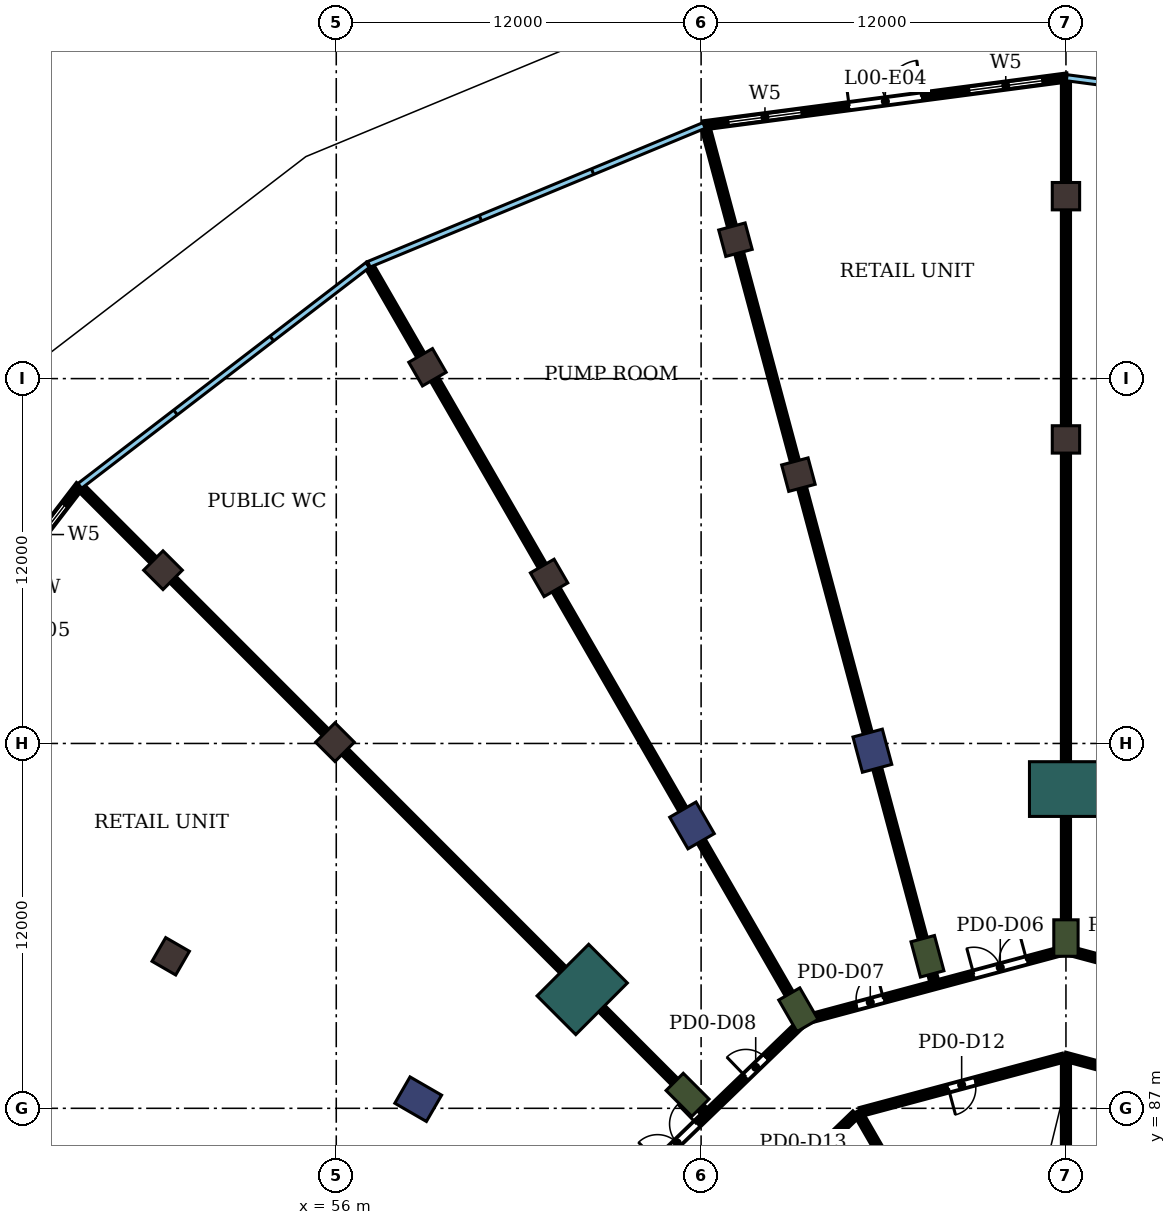
"""IFC4 building model, lengths in metres.
Left out: names, types, materials, properties, quantities, classifications, styles, units other than length and angle.
Written with IfcOpenShell. Run it as: python <this file> out.ifc"""

import sys

from ifc_helpers import new_model, si_unit, direction, frame, frame_2d, origin, origin_2d, place, context, subcontext, project, spatial, rectangle, extrude, element, fill, save


model = new_model("IFC4")
c1 = context("Model", 3, precision=1e-05, world=origin(), true_north=direction((0.0, 1.0)))
c2 = subcontext(c1, "Body", "Model", "MODEL_VIEW")
j1 = project(units=[si_unit("LENGTHUNIT", "METRE"), si_unit("PLANEANGLEUNIT", "RADIAN")], contexts=[c1])
p1 = place(None, origin())
s1 = spatial("IfcSite", under=j1, at=p1, CompositionType="ELEMENT")
p2 = place(p1, origin())
s2 = spatial("IfcBuilding", under=s1, at=p2, CompositionType="ELEMENT")
p3 = place(p2, origin())
s3 = spatial("IfcBuildingStorey", under=s2, at=p3, CompositionType="ELEMENT", Elevation=0.0)
for number, where, z_axis, x_axis in (
    (1, (80.0, 117.0, 0.0), (0.0, 0.0, 1.0), (0.0, 1.0, 0.0)),
    (2, (69.13, 115.569, 0.0), (0.0, 0.0, 1.0), (-0.259, 0.966, 0.0)),
    (3, (59.0, 111.373, 0.0), (0.0, 0.0, 1.0), (-0.5, 0.866, 0.0)),
    (4, (50.302, 104.698, 0.0), (0.0, 0.0, 1.0), (-0.707, 0.707, 0.0)),
    (5, (80.0, 109.0, 0.0), (0.0, 0.0, 1.0), (0.0, 1.0, 0.0)),
    (6, (71.2, 107.842, 0.0), (0.0, 0.0, 1.0), (-0.259, 0.966, 0.0)),
    (7, (63.0, 104.445, 0.0), (0.0, 0.0, 1.0), (-0.5, 0.866, 0.0)),
    (8, (55.958, 99.042, 0.0), (0.0, 0.0, 1.0), (-0.707, 0.707, 0.0)),
    (9, (50.555, 92.0, 0.0), (0.0, 0.0, 1.0), (-0.866, 0.5, 0.0)),
):
    element("IfcColumn", number, at=place(p3, frame(where, z_axis=z_axis, x_axis=x_axis)), inside=s3, PredefinedType="COLUMN", context=c2, shape_type="SweptSolid", body=[
        extrude(rectangle(XDim=0.9, YDim=0.9, at=origin_2d()), origin(), (0.0, 0.0, 1.0), 7.0),
    ])
for number, where, z_axis, x_axis in (
    (10, (73.633, 98.762, 0.0), (0.0, 0.0, 1.0), (-0.259, 0.966, 0.0)),
    (11, (67.7, 96.304, 0.0), (0.0, 0.0, 1.0), (-0.5, 0.866, 0.0)),
    (12, (58.696, 87.3, 0.0), (0.0, 0.0, 1.0), (-0.866, 0.5, 0.0)),
):
    element("IfcColumn", number, at=place(p3, frame(where, z_axis=z_axis, x_axis=x_axis)), inside=s3, PredefinedType="COLUMN", context=c2, shape_type="SweptSolid", body=[
        extrude(rectangle(XDim=1.2, YDim=1.0, at=origin_2d()), origin(), (0.0, 0.0, 1.0), 7.0),
    ])
for number, where, z_axis, x_axis in (
    (13, (80.0, 92.6, 0.0), (0.0, 0.0, 1.0), (0.0, 1.0, 0.0)),
    (14, (75.445, 92.0, 0.0), (0.0, 0.0, 1.0), (-0.259, 0.966, 0.0)),
    (15, (71.2, 90.242, 0.0), (0.0, 0.0, 1.0), (-0.5, 0.866, 0.0)),
    (16, (67.555, 87.445, 0.0), (0.0, 0.0, 1.0), (-0.707, 0.707, 0.0)),
):
    element("IfcColumn", number, at=place(p3, frame(where, z_axis=z_axis, x_axis=x_axis)), inside=s3, PredefinedType="COLUMN", context=c2, shape_type="SweptSolid", body=[
        extrude(rectangle(XDim=1.2, YDim=0.8, at=origin_2d()), origin(), (0.0, 0.0, 1.0), 7.0),
    ])
for number, where, z_axis, x_axis in (
    (17, (80.0, 97.5, 0.0), (0.0, 0.0, 1.0), (0.0, 1.0, 0.0)),
    (18, (64.09, 90.91, 0.0), (0.0, 0.0, 1.0), (-0.707, 0.707, 0.0)),
):
    element("IfcColumn", number, at=place(p3, frame(where, z_axis=z_axis, x_axis=x_axis)), inside=s3, PredefinedType="COLUMN", context=c2, shape_type="SweptSolid", body=[
        extrude(rectangle(XDim=1.8, YDim=2.4, at=origin_2d()), origin(), (0.0, 0.0, 1.0), 7.0),
    ])
p4 = place(p3, frame((80.0, 120.899, 0.0), z_axis=(0.0, 0.0, 1.0), x_axis=(-0.991445069361, -0.130524612391, 0.0)))
e19 = element("IfcWall", 19, at=p4, inside=s3, PredefinedType="NOTDEFINED", context=c2, shape_type="SweptSolid", body=[
    extrude(rectangle(XDim=11.982, YDim=0.2, at=frame_2d((5.991, 0.0))), origin(), (0.0, 0.0, 1.0), 7.0),
])
p5 = place(p4, frame((0.797, 0.0, 0.9)))
e20 = element("IfcOpeningElement", 20, at=p5, cuts=e19, PredefinedType="OPENING", context=c2, shape_type="SweptSolid", body=[
    extrude(rectangle(XDim=2.4, YDim=3.6, at=frame_2d((1.2, 1.8))), frame((0.0, 0.11, 0.0), z_axis=(0.0, -1.0, 0.0), x_axis=(1.0, 0.0, 0.0)), (0.0, 0.0, 1.0), 0.22),
])
p6 = place(p4, frame((4.791, 0.0, 0.0)))
e21 = element("IfcOpeningElement", 21, at=p6, cuts=e19, PredefinedType="OPENING", context=c2, shape_type="SweptSolid", body=[
    extrude(rectangle(XDim=2.4, YDim=2.7, at=frame_2d((1.2, 1.35))), frame((0.0, 0.11, 0.0), z_axis=(0.0, -1.0, 0.0), x_axis=(1.0, 0.0, 0.0)), (0.0, 0.0, 1.0), 0.22),
])
p7 = place(p4, frame((8.785, 0.0, 0.9)))
e22 = element("IfcOpeningElement", 22, at=p7, cuts=e19, PredefinedType="OPENING", context=c2, shape_type="SweptSolid", body=[
    extrude(rectangle(XDim=2.4, YDim=3.6, at=frame_2d((1.2, 1.8))), frame((0.0, 0.11, 0.0), z_axis=(0.0, -1.0, 0.0), x_axis=(1.0, 0.0, 0.0)), (0.0, 0.0, 1.0), 0.22),
])
p8 = place(p3, frame((47.544, 107.456, 0.0), z_axis=(0.0, 0.0, 1.0), x_axis=(-0.608756159021, -0.793357384068, 0.0)))
e23 = element("IfcWall", 23, at=p8, inside=s3, PredefinedType="NOTDEFINED", context=c2, shape_type="SweptSolid", body=[
    extrude(rectangle(XDim=11.982, YDim=0.2, at=frame_2d((5.991, 0.0))), origin(), (0.0, 0.0, 1.0), 7.0),
])
p9 = place(p8, frame((0.797, 0.0, 0.9)))
e24 = element("IfcOpeningElement", 24, at=p9, cuts=e23, PredefinedType="OPENING", context=c2, shape_type="SweptSolid", body=[
    extrude(rectangle(XDim=2.4, YDim=3.6, at=frame_2d((1.2, 1.8))), frame((0.0, 0.11, 0.0), z_axis=(0.0, -1.0, 0.0), x_axis=(1.0, 0.0, 0.0)), (0.0, 0.0, 1.0), 0.22),
])
p10 = place(p8, frame((4.791, 0.0, 0.0)))
e25 = element("IfcOpeningElement", 25, at=p10, cuts=e23, PredefinedType="OPENING", context=c2, shape_type="SweptSolid", body=[
    extrude(rectangle(XDim=2.4, YDim=2.7, at=frame_2d((1.2, 1.35))), frame((0.0, 0.11, 0.0), z_axis=(0.0, -1.0, 0.0), x_axis=(1.0, 0.0, 0.0)), (0.0, 0.0, 1.0), 0.22),
])
p11 = place(p8, frame((8.785, 0.0, 0.9)))
e26 = element("IfcOpeningElement", 26, at=p11, cuts=e23, PredefinedType="OPENING", context=c2, shape_type="SweptSolid", body=[
    extrude(rectangle(XDim=2.4, YDim=3.6, at=frame_2d((1.2, 1.8))), frame((0.0, 0.11, 0.0), z_axis=(0.0, -1.0, 0.0), x_axis=(1.0, 0.0, 0.0)), (0.0, 0.0, 1.0), 0.22),
])
p12 = place(p3, frame((47.623, 107.392, 0.0), z_axis=(0.0, 0.0, 1.0), x_axis=(0.70693841041, -0.707275111882, 0.0)))
e27 = element("IfcWall", 27, at=p12, inside=s3, PredefinedType="PARTITIONING", context=c2, shape_type="SweptSolid", body=[
    extrude(rectangle(XDim=29.004, YDim=0.2, at=frame_2d((14.502, 0.0))), origin(), (0.0, 0.0, 1.0), 5.65),
])
p13 = place(p3, frame((57.107, 114.666, 0.0), z_axis=(0.0, 0.0, 1.0), x_axis=(0.499851749166, -0.866110979526, 0.0)))
e28 = element("IfcWall", 28, at=p13, inside=s3, PredefinedType="PARTITIONING", context=c2, shape_type="SweptSolid", body=[
    extrude(rectangle(XDim=28.496, YDim=0.2, at=frame_2d((14.248, 0.0))), origin(), (0.0, 0.0, 1.0), 5.65),
])
p14 = place(p3, frame((66.22, 84.9, 0.0), z_axis=(0.0, 0.0, 1.0), x_axis=(0.719621348931, 0.694366700068, 0.0)))
e29 = element("IfcWall", 29, at=p14, inside=s3, PredefinedType="PARTITIONING", context=c2, shape_type="SweptSolid", body=[
    extrude(rectangle(XDim=7.173, YDim=0.2, at=frame_2d((3.586, 0.0))), origin(), (0.0, 0.0, 1.0), 6.05),
])
p15 = place(p14, frame((4.519, 0.0, 0.0)))
e30 = element("IfcOpeningElement", 30, at=p15, cuts=e29, PredefinedType="OPENING", context=c2, shape_type="SweptSolid", body=[
    extrude(rectangle(XDim=0.9, YDim=2.1, at=frame_2d((0.45, 1.05))), frame((0.0, 0.11, 0.0), z_axis=(0.0, -1.0, 0.0), x_axis=(1.0, 0.0, 0.0)), (0.0, 0.0, 1.0), 0.22),
])
p16 = place(p14, frame((0.482, 0.0, 0.0)))
e31 = element("IfcOpeningElement", 31, at=p16, cuts=e29, PredefinedType="OPENING", context=c2, shape_type="SweptSolid", body=[
    extrude(rectangle(XDim=1.8, YDim=2.1, at=frame_2d((0.9, 1.05))), frame((0.0, 0.11, 0.0), z_axis=(0.0, -1.0, 0.0), x_axis=(1.0, 0.0, 0.0)), (0.0, 0.0, 1.0), 0.22),
])
p17 = place(p3, frame((68.151, 119.238, 0.0), z_axis=(0.0, 0.0, 1.0), x_axis=(0.258758470918, -0.965942055057, 0.0)))
e32 = element("IfcWall", 32, at=p17, inside=s3, PredefinedType="PARTITIONING", context=c2, shape_type="SweptSolid", body=[
    extrude(rectangle(XDim=29.074, YDim=0.2, at=frame_2d((14.537, 0.0))), origin(), (0.0, 0.0, 1.0), 5.65),
])
p18 = place(p3, frame((69.563, 83.4, 0.0), z_axis=(0.0, 0.0, 1.0), x_axis=(0.719454254864, 0.694539829785, 0.0)))
e33 = element("IfcWall", 33, at=p18, inside=s3, PredefinedType="PARTITIONING", context=c2, shape_type="SweptSolid", body=[
    extrude(rectangle(XDim=4.86, YDim=0.2, at=frame_2d((2.43, 0.0))), origin(), (0.0, 0.0, 1.0), 6.55),
])
p19 = place(p18, frame((1.985, 0.0, 0.0)))
e34 = element("IfcOpeningElement", 34, at=p19, cuts=e33, PredefinedType="OPENING", context=c2, shape_type="SweptSolid", body=[
    extrude(rectangle(XDim=1.0, YDim=2.1, at=frame_2d((0.5, 1.05))), frame((0.0, 0.11, 0.0), z_axis=(0.0, -1.0, 0.0), x_axis=(1.0, 0.0, 0.0)), (0.0, 0.0, 1.0), 0.22),
])
p20 = place(p3, frame((71.411, 89.908, 0.0), z_axis=(0.0, 0.0, 1.0), x_axis=(0.965907314361, 0.258888122678, 0.0)))
e35 = element("IfcWall", 35, at=p20, inside=s3, PredefinedType="PARTITIONING", context=c2, shape_type="SweptSolid", body=[
    extrude(rectangle(XDim=8.802, YDim=0.2, at=frame_2d((4.401, 0.0))), origin(), (0.0, 0.0, 1.0), 6.05),
])
p21 = place(p20, frame((5.755, 0.0, 0.0)))
e36 = element("IfcOpeningElement", 36, at=p21, cuts=e35, PredefinedType="OPENING", context=c2, shape_type="SweptSolid", body=[
    extrude(rectangle(XDim=1.8, YDim=2.1, at=frame_2d((0.9, 1.05))), frame((0.0, 0.11, 0.0), z_axis=(0.0, -1.0, 0.0), x_axis=(1.0, 0.0, 0.0)), (0.0, 0.0, 1.0), 0.22),
])
p22 = place(p20, frame((1.779, 0.0, 0.0)))
e37 = element("IfcOpeningElement", 37, at=p22, cuts=e35, PredefinedType="OPENING", context=c2, shape_type="SweptSolid", body=[
    extrude(rectangle(XDim=0.9, YDim=2.1, at=frame_2d((0.45, 1.05))), frame((0.0, 0.11, 0.0), z_axis=(0.0, -1.0, 0.0), x_axis=(1.0, 0.0, 0.0)), (0.0, 0.0, 1.0), 0.22),
])
p23 = place(p3, frame((73.284, 86.891, 0.0), z_axis=(0.0, 0.0, 1.0), x_axis=(0.965937351185, 0.258776029775, 0.0)))
e38 = element("IfcWall", 38, at=p23, inside=s3, PredefinedType="PARTITIONING", context=c2, shape_type="SweptSolid", body=[
    extrude(rectangle(XDim=6.823, YDim=0.2, at=frame_2d((3.412, 0.0))), origin(), (0.0, 0.0, 1.0), 6.55),
])
p24 = place(p23, frame((2.951, 0.0, 0.0)))
e39 = element("IfcOpeningElement", 39, at=p24, cuts=e38, PredefinedType="OPENING", context=c2, shape_type="SweptSolid", body=[
    extrude(rectangle(XDim=0.9, YDim=2.1, at=frame_2d((0.45, 1.05))), frame((0.0, 0.11, 0.0), z_axis=(0.0, -1.0, 0.0), x_axis=(1.0, 0.0, 0.0)), (0.0, 0.0, 1.0), 0.22),
])
p25 = place(p3, frame((73.156, 86.856, 0.0), z_axis=(0.0, 0.0, 1.0), x_axis=(0.49984238301, -0.866116384874, 0.0)))
e40 = element("IfcWall", 40, at=p25, inside=s3, PredefinedType="PARTITIONING", context=c2, shape_type="SweptSolid", body=[
    extrude(rectangle(XDim=5.992, YDim=0.2, at=frame_2d((2.996, 0.0))), origin(), (0.0, 0.0, 1.0), 6.55),
])
p26 = place(p3, frame((80.0, 82.699, 0.0), z_axis=(0.0, 0.0, 1.0), x_axis=(0.0, 1.0, 0.0)))
e41 = element("IfcWall", 41, at=p26, inside=s3, PredefinedType="PARTITIONING", context=c2, shape_type="SweptSolid", body=[
    extrude(rectangle(XDim=5.861, YDim=0.2, at=frame_2d((2.931, 0.0))), origin(), (0.0, 0.0, 1.0), 6.55),
])
p27 = place(p3, frame((80.0, 88.69, 0.0), z_axis=(0.0, 0.0, 1.0), x_axis=(0.965929896633, -0.258803853893, 0.0)))
e42 = element("IfcWall", 42, at=p27, inside=s3, PredefinedType="PARTITIONING", context=c2, shape_type="SweptSolid", body=[
    extrude(rectangle(XDim=6.963, YDim=0.2, at=frame_2d((3.481, 0.0))), origin(), (0.0, 0.0, 1.0), 6.55),
])
p28 = place(p27, frame((3.102, 0.0, 0.0)))
e43 = element("IfcOpeningElement", 43, at=p28, cuts=e42, PredefinedType="OPENING", context=c2, shape_type="SweptSolid", body=[
    extrude(rectangle(XDim=0.9, YDim=2.1, at=frame_2d((0.45, 1.05))), frame((0.0, 0.11, 0.0), z_axis=(0.0, -1.0, 0.0), x_axis=(1.0, 0.0, 0.0)), (0.0, 0.0, 1.0), 0.22),
])
p29 = place(p3, frame((80.0, 92.3, 0.0), z_axis=(0.0, 0.0, 1.0), x_axis=(0.0, 1.0, 0.0)))
e44 = element("IfcWall", 44, at=p29, inside=s3, PredefinedType="PARTITIONING", context=c2, shape_type="SweptSolid", body=[
    extrude(rectangle(XDim=28.498, YDim=0.2, at=frame_2d((14.249, 0.0))), origin(), (0.0, 0.0, 1.0), 5.65),
])
p30 = place(p3, frame((80.0, 92.21, 0.0), z_axis=(0.0, 0.0, 1.0), x_axis=(0.965910452724, -0.258876413213, 0.0)))
e45 = element("IfcWall", 45, at=p30, inside=s3, PredefinedType="PARTITIONING", context=c2, shape_type="SweptSolid", body=[
    extrude(rectangle(XDim=8.812, YDim=0.2, at=frame_2d((4.406, 0.0))), origin(), (0.0, 0.0, 1.0), 6.05),
])
p31 = place(p30, frame((6.213, 0.0, 0.0)))
e46 = element("IfcOpeningElement", 46, at=p31, cuts=e45, PredefinedType="OPENING", context=c2, shape_type="SweptSolid", body=[
    extrude(rectangle(XDim=0.9, YDim=2.1, at=frame_2d((0.45, 1.05))), frame((0.0, 0.11, 0.0), z_axis=(0.0, -1.0, 0.0), x_axis=(1.0, 0.0, 0.0)), (0.0, 0.0, 1.0), 0.22),
])
p32 = place(p30, frame((1.787, 0.0, 0.0)))
e47 = element("IfcOpeningElement", 47, at=p32, cuts=e45, PredefinedType="OPENING", context=c2, shape_type="SweptSolid", body=[
    extrude(rectangle(XDim=0.9, YDim=2.1, at=frame_2d((0.45, 1.05))), frame((0.0, 0.11, 0.0), z_axis=(0.0, -1.0, 0.0), x_axis=(1.0, 0.0, 0.0)), (0.0, 0.0, 1.0), 0.22),
])
p33 = place(p5, origin())
e48 = element("IfcWindow", 48, at=p33, inside=s3, PartitioningType="SINGLE_PANEL", PredefinedType="WINDOW", context=c2, shape_type="SweptSolid", body=[
    extrude(rectangle(XDim=2.4, YDim=3.6, at=frame_2d((1.2, 1.8))), frame((0.0, 0.03, 0.0), z_axis=(0.0, -1.0, 0.0), x_axis=(1.0, 0.0, 0.0)), (0.0, 0.0, 1.0), 0.06),
])
fill(e20, e48)
p34 = place(p6, frame((2.4, 0.0, 0.0), z_axis=(0.0, 0.0, 1.0), x_axis=(-1.0, 0.0, 0.0)))
e49 = element("IfcDoor", 49, at=p34, inside=s3, OperationType="DOUBLE_DOOR_SINGLE_SWING", PredefinedType="DOOR", context=c2, shape_type="SweptSolid", body=[
    extrude(rectangle(XDim=2.4, YDim=2.7, at=frame_2d((1.2, 1.35))), frame((0.0, 0.025, 0.0), z_axis=(0.0, -1.0, 0.0), x_axis=(1.0, 0.0, 0.0)), (0.0, 0.0, 1.0), 0.05),
])
fill(e21, e49)
p35 = place(p7, origin())
e50 = element("IfcWindow", 50, at=p35, inside=s3, PartitioningType="SINGLE_PANEL", PredefinedType="WINDOW", context=c2, shape_type="SweptSolid", body=[
    extrude(rectangle(XDim=2.4, YDim=3.6, at=frame_2d((1.2, 1.8))), frame((0.0, 0.03, 0.0), z_axis=(0.0, -1.0, 0.0), x_axis=(1.0, 0.0, 0.0)), (0.0, 0.0, 1.0), 0.06),
])
fill(e22, e50)
p36 = place(p9, origin())
e51 = element("IfcWindow", 51, at=p36, inside=s3, PartitioningType="SINGLE_PANEL", PredefinedType="WINDOW", context=c2, shape_type="SweptSolid", body=[
    extrude(rectangle(XDim=2.4, YDim=3.6, at=frame_2d((1.2, 1.8))), frame((0.0, 0.03, 0.0), z_axis=(0.0, -1.0, 0.0), x_axis=(1.0, 0.0, 0.0)), (0.0, 0.0, 1.0), 0.06),
])
fill(e24, e51)
p37 = place(p21, origin())
e52 = element("IfcDoor", 52, at=p37, inside=s3, OperationType="DOUBLE_DOOR_SINGLE_SWING", PredefinedType="DOOR", context=c2, shape_type="SweptSolid", body=[
    extrude(rectangle(XDim=1.8, YDim=2.1, at=frame_2d((0.9, 1.05))), frame((0.0, 0.025, 0.0), z_axis=(0.0, -1.0, 0.0), x_axis=(1.0, 0.0, 0.0)), (0.0, 0.0, 1.0), 0.05),
])
fill(e36, e52)
p38 = place(p22, origin())
e53 = element("IfcDoor", 53, at=p38, inside=s3, OperationType="SINGLE_SWING_RIGHT", PredefinedType="DOOR", context=c2, shape_type="SweptSolid", body=[
    extrude(rectangle(XDim=0.9, YDim=2.1, at=frame_2d((0.45, 1.05))), frame((0.0, 0.025, 0.0), z_axis=(0.0, -1.0, 0.0), x_axis=(1.0, 0.0, 0.0)), (0.0, 0.0, 1.0), 0.05),
])
fill(e37, e53)
p39 = place(p15, origin())
e54 = element("IfcDoor", 54, at=p39, inside=s3, OperationType="SINGLE_SWING_LEFT", PredefinedType="DOOR", context=c2, shape_type="SweptSolid", body=[
    extrude(rectangle(XDim=0.9, YDim=2.1, at=frame_2d((0.45, 1.05))), frame((0.0, 0.025, 0.0), z_axis=(0.0, -1.0, 0.0), x_axis=(1.0, 0.0, 0.0)), (0.0, 0.0, 1.0), 0.05),
])
fill(e30, e54)
p40 = place(p16, origin())
e55 = element("IfcDoor", 55, at=p40, inside=s3, OperationType="DOUBLE_DOOR_SINGLE_SWING", PredefinedType="DOOR", context=c2, shape_type="SweptSolid", body=[
    extrude(rectangle(XDim=1.8, YDim=2.1, at=frame_2d((0.9, 1.05))), frame((0.0, 0.025, 0.0), z_axis=(0.0, -1.0, 0.0), x_axis=(1.0, 0.0, 0.0)), (0.0, 0.0, 1.0), 0.05),
])
fill(e31, e55)
p41 = place(p24, frame((0.9, 0.0, 0.0), z_axis=(0.0, 0.0, 1.0), x_axis=(-1.0, 0.0, 0.0)))
e56 = element("IfcDoor", 56, at=p41, inside=s3, OperationType="SINGLE_SWING_RIGHT", PredefinedType="DOOR", context=c2, shape_type="SweptSolid", body=[
    extrude(rectangle(XDim=0.9, YDim=2.1, at=frame_2d((0.45, 1.05))), frame((0.0, 0.025, 0.0), z_axis=(0.0, -1.0, 0.0), x_axis=(1.0, 0.0, 0.0)), (0.0, 0.0, 1.0), 0.05),
])
fill(e39, e56)
save(model, sys.argv[1])
